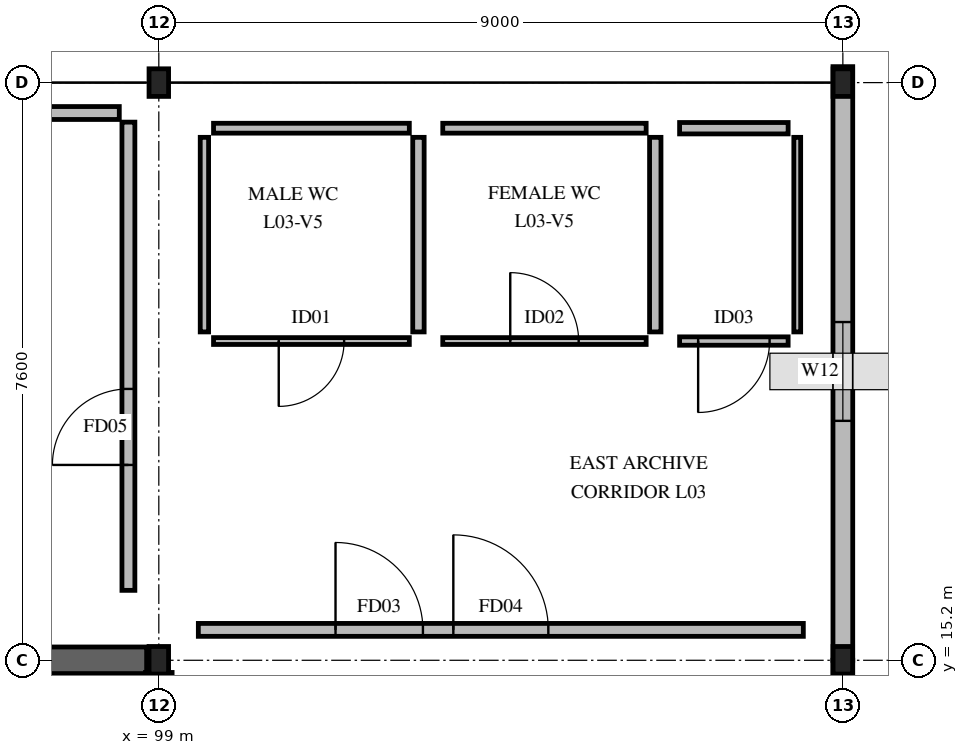
"""IFC4 building model, lengths in metres.
Left out: names, types, materials, properties, quantities, classifications, styles, units other than length and angle.
Written with IfcOpenShell. Run it as: python <this file> out.ifc"""

import sys

from ifc_helpers import new_model, si_unit, direction, frame, frame_2d, origin, origin_2d, place, context, subcontext, project, spatial, rectangle, i_section, extrude, element, fill, save


model = new_model("IFC4")
c1 = context("Model", 3, precision=1e-05, world=origin(), true_north=direction((0.0, 1.0)))
c2 = subcontext(c1, "Body", "Model", "MODEL_VIEW")
j1 = project(units=[si_unit("LENGTHUNIT", "METRE"), si_unit("PLANEANGLEUNIT", "RADIAN")], contexts=[c1])
p1 = place(None, origin())
s1 = spatial("IfcSite", under=j1, at=p1, CompositionType="ELEMENT")
p2 = place(p1, origin())
s2 = spatial("IfcBuilding", under=s1, at=p2, CompositionType="ELEMENT")
p3 = place(p2, frame((0.0, 0.0, 13.68)))
s3 = spatial("IfcBuildingStorey", under=s2, at=p3, CompositionType="ELEMENT", Elevation=13.68)
for number, where, z_axis, x_axis in (
    (1, (99.0, 15.2, 0.0), (0.0, 0.0, 1.0), (1.0, 0.0, 0.0)),
    (2, (99.0, 22.8, 0.0), (0.0, 0.0, 1.0), (1.0, 0.0, 0.0)),
    (3, (108.0, 15.2, 0.0), (0.0, 0.0, 1.0), (1.0, 0.0, 0.0)),
    (4, (108.0, 22.8, 0.0), (0.0, 0.0, 1.0), (1.0, 0.0, 0.0)),
):
    element("IfcColumn", number, at=place(p3, frame(where, z_axis=z_axis, x_axis=x_axis)), inside=s3, PredefinedType="COLUMN", context=c2, shape_type="SweptSolid", body=[
        extrude(i_section(OverallWidth=0.257, OverallDepth=0.363, WebThickness=0.013, FlangeThickness=0.022, FilletRadius=0.015, at=origin_2d()), origin(), (0.0, 0.0, 1.0), 4.32),
    ])
p4 = place(p3, frame((108.0, 7.6, 0.0), z_axis=(0.0, 0.0, 1.0), x_axis=(0.0, 1.0, 0.0)))
e5 = element("IfcWall", 5, at=p4, inside=s3, PredefinedType="STANDARD", context=c2, shape_type="SweptSolid", body=[
    extrude(rectangle(XDim=7.6, YDim=0.26, at=frame_2d((3.8, 0.0))), origin(), (0.0, 0.0, 1.0), 3.484),
])
p5 = place(p4, frame((3.325, 0.0, 0.85)))
e6 = element("IfcOpeningElement", 6, at=p5, cuts=e5, PredefinedType="OPENING", context=c2, shape_type="SweptSolid", body=[
    extrude(rectangle(XDim=0.95, YDim=1.35, at=frame_2d((0.475, 0.675))), frame((0.0, 0.14, 0.0), z_axis=(0.0, -1.0, 0.0), x_axis=(1.0, 0.0, 0.0)), (0.0, 0.0, 1.0), 0.28),
])
p6 = place(p3, frame((108.0, 15.2, 0.0), z_axis=(0.0, 0.0, 1.0), x_axis=(0.0, 1.0, 0.0)))
e7 = element("IfcWall", 7, at=p6, inside=s3, PredefinedType="STANDARD", context=c2, shape_type="SweptSolid", body=[
    extrude(rectangle(XDim=7.81, YDim=0.26, at=frame_2d((3.905, 0.0))), origin(), (0.0, 0.0, 1.0), 3.484),
])
p7 = place(p6, frame((3.15, 0.0, 0.85)))
e8 = element("IfcOpeningElement", 8, at=p7, cuts=e7, PredefinedType="OPENING", context=c2, shape_type="SweptSolid", body=[
    extrude(rectangle(XDim=1.3, YDim=1.35, at=frame_2d((0.65, 0.675))), frame((0.0, 0.14, 0.0), z_axis=(0.0, -1.0, 0.0), x_axis=(1.0, 0.0, 0.0)), (0.0, 0.0, 1.0), 0.28),
])
p8 = place(p3, frame((90.16, 15.2, 0.0), z_axis=(0.0, 0.0, 1.0), x_axis=(1.0, 0.0, 0.0)))
e9 = element("IfcWall", 9, at=p8, inside=s3, PredefinedType="SHEAR", context=c2, shape_type="SweptSolid", body=[
    extrude(rectangle(XDim=8.68, YDim=0.35, at=frame_2d((4.34, 0.0))), origin(), (0.0, 0.0, 1.0), 4.04),
])
p9 = place(p8, frame((1.85, 0.0, 0.0)))
e10 = element("IfcOpeningElement", 10, at=p9, cuts=e9, PredefinedType="OPENING", context=c2, shape_type="SweptSolid", body=[
    extrude(rectangle(XDim=1.0, YDim=2.15, at=frame_2d((0.5, 1.075))), frame((0.0, 0.185, 0.0), z_axis=(0.0, -1.0, 0.0), x_axis=(1.0, 0.0, 0.0)), (0.0, 0.0, 1.0), 0.37),
])
p10 = place(p8, frame((6.05, 0.0, 0.0)))
e11 = element("IfcOpeningElement", 11, at=p10, cuts=e9, PredefinedType="OPENING", context=c2, shape_type="SweptSolid", body=[
    extrude(rectangle(XDim=1.35, YDim=2.18, at=frame_2d((0.675, 1.09))), frame((0.0, 0.185, 0.0), z_axis=(0.0, -1.0, 0.0), x_axis=(1.0, 0.0, 0.0)), (0.0, 0.0, 1.0), 0.37),
])
p11 = place(p3, frame((99.0, 0.16, 0.0), z_axis=(0.0, 0.0, 1.0), x_axis=(0.0, 1.0, 0.0)))
e12 = element("IfcWall", 12, at=p11, inside=s3, PredefinedType="SHEAR", context=c2, shape_type="SweptSolid", body=[
    extrude(rectangle(XDim=14.88, YDim=0.35, at=frame_2d((7.44, 0.0))), origin(), (0.0, 0.0, 1.0), 4.04),
])
p12 = place(p3, frame((98.6, 16.12, 0.0), z_axis=(0.0, 0.0, 1.0), x_axis=(0.0, 1.0, 0.0)))
e13 = element("IfcWall", 13, at=p12, inside=s3, PredefinedType="PARTITIONING", context=c2, shape_type="SweptSolid", body=[
    extrude(rectangle(XDim=6.16, YDim=0.17, at=frame_2d((3.08, 0.0))), origin(), (0.0, 0.0, 1.0), 4.04),
])
p13 = place(p12, frame((1.65, 0.0, 0.0)))
e14 = element("IfcOpeningElement", 14, at=p13, cuts=e13, PredefinedType="OPENING", context=c2, shape_type="SweptSolid", body=[
    extrude(rectangle(XDim=1.0, YDim=2.15, at=frame_2d((0.5, 1.075))), frame((0.0, 0.095, 0.0), z_axis=(0.0, -1.0, 0.0), x_axis=(1.0, 0.0, 0.0)), (0.0, 0.0, 1.0), 0.19),
])
p14 = place(p3, frame((99.52, 15.6, 0.0), z_axis=(0.0, 0.0, 1.0), x_axis=(1.0, 0.0, 0.0)))
e15 = element("IfcWall", 15, at=p14, inside=s3, PredefinedType="PARTITIONING", context=c2, shape_type="SweptSolid", body=[
    extrude(rectangle(XDim=7.96, YDim=0.17, at=frame_2d((3.98, 0.0))), origin(), (0.0, 0.0, 1.0), 4.04),
])
p15 = place(p14, frame((3.355, 0.0, 0.0)))
e16 = element("IfcOpeningElement", 16, at=p15, cuts=e15, PredefinedType="OPENING", context=c2, shape_type="SweptSolid", body=[
    extrude(rectangle(XDim=1.25, YDim=2.18, at=frame_2d((0.625, 1.09))), frame((0.0, 0.095, 0.0), z_axis=(0.0, -1.0, 0.0), x_axis=(1.0, 0.0, 0.0)), (0.0, 0.0, 1.0), 0.19),
])
p16 = place(p14, frame((1.805, 0.0, 0.0)))
e17 = element("IfcOpeningElement", 17, at=p16, cuts=e15, PredefinedType="OPENING", context=c2, shape_type="SweptSolid", body=[
    extrude(rectangle(XDim=1.15, YDim=2.15, at=frame_2d((0.575, 1.075))), frame((0.0, 0.095, 0.0), z_axis=(0.0, -1.0, 0.0), x_axis=(1.0, 0.0, 0.0)), (0.0, 0.0, 1.0), 0.19),
])
p17 = place(p3, frame((99.72, 19.4, 0.0), z_axis=(0.0, 0.0, 1.0), x_axis=(1.0, 0.0, 0.0)))
e18 = element("IfcWall", 18, at=p17, inside=s3, PredefinedType="PARTITIONING", context=c2, shape_type="SweptSolid", body=[
    extrude(rectangle(XDim=2.576, YDim=0.09, at=frame_2d((1.288, 0.0))), origin(), (0.0, 0.0, 1.0), 4.04),
])
p18 = place(p17, frame((0.858, 0.0, 0.0)))
e19 = element("IfcOpeningElement", 19, at=p18, cuts=e18, PredefinedType="OPENING", context=c2, shape_type="SweptSolid", body=[
    extrude(rectangle(XDim=0.86, YDim=2.06, at=frame_2d((0.43, 1.03))), frame((0.0, 0.055, 0.0), z_axis=(0.0, -1.0, 0.0), x_axis=(1.0, 0.0, 0.0)), (0.0, 0.0, 1.0), 0.11),
])
p19 = place(p3, frame((102.416, 19.52, 0.0), z_axis=(0.0, 0.0, 1.0), x_axis=(0.0, 1.0, 0.0)))
e20 = element("IfcWall", 20, at=p19, inside=s3, PredefinedType="PARTITIONING", context=c2, shape_type="SweptSolid", body=[
    extrude(rectangle(XDim=2.56, YDim=0.15, at=frame_2d((1.28, 0.0))), origin(), (0.0, 0.0, 1.0), 4.04),
])
p20 = place(p3, frame((99.72, 22.2, 0.0), z_axis=(0.0, 0.0, 1.0), x_axis=(1.0, 0.0, 0.0)))
e21 = element("IfcWall", 21, at=p20, inside=s3, PredefinedType="PARTITIONING", context=c2, shape_type="SweptSolid", body=[
    extrude(rectangle(XDim=2.576, YDim=0.13, at=frame_2d((1.288, 0.0))), origin(), (0.0, 0.0, 1.0), 4.04),
])
p21 = place(p3, frame((99.6, 19.52, 0.0), z_axis=(0.0, 0.0, 1.0), x_axis=(0.0, 1.0, 0.0)))
e22 = element("IfcWall", 22, at=p21, inside=s3, PredefinedType="PARTITIONING", context=c2, shape_type="SweptSolid", body=[
    extrude(rectangle(XDim=2.56, YDim=0.11, at=frame_2d((1.28, 0.0))), origin(), (0.0, 0.0, 1.0), 4.04),
])
p22 = place(p3, frame((102.736, 19.4, 0.0), z_axis=(0.0, 0.0, 1.0), x_axis=(1.0, 0.0, 0.0)))
e23 = element("IfcWall", 23, at=p22, inside=s3, PredefinedType="PARTITIONING", context=c2, shape_type="SweptSolid", body=[
    extrude(rectangle(XDim=2.676, YDim=0.09, at=frame_2d((1.338, 0.0))), origin(), (0.0, 0.0, 1.0), 4.04),
])
p23 = place(p22, frame((0.888, 0.0, 0.0)))
e24 = element("IfcOpeningElement", 24, at=p23, cuts=e23, PredefinedType="OPENING", context=c2, shape_type="SweptSolid", body=[
    extrude(rectangle(XDim=0.9, YDim=2.06, at=frame_2d((0.45, 1.03))), frame((0.0, 0.055, 0.0), z_axis=(0.0, -1.0, 0.0), x_axis=(1.0, 0.0, 0.0)), (0.0, 0.0, 1.0), 0.11),
])
p24 = place(p3, frame((105.532, 19.52, 0.0), z_axis=(0.0, 0.0, 1.0), x_axis=(0.0, 1.0, 0.0)))
e25 = element("IfcWall", 25, at=p24, inside=s3, PredefinedType="PARTITIONING", context=c2, shape_type="SweptSolid", body=[
    extrude(rectangle(XDim=2.56, YDim=0.15, at=frame_2d((1.28, 0.0))), origin(), (0.0, 0.0, 1.0), 4.04),
])
p25 = place(p3, frame((102.736, 22.2, 0.0), z_axis=(0.0, 0.0, 1.0), x_axis=(1.0, 0.0, 0.0)))
e26 = element("IfcWall", 26, at=p25, inside=s3, PredefinedType="PARTITIONING", context=c2, shape_type="SweptSolid", body=[
    extrude(rectangle(XDim=2.676, YDim=0.13, at=frame_2d((1.338, 0.0))), origin(), (0.0, 0.0, 1.0), 4.04),
])
p26 = place(p3, frame((105.852, 19.4, 0.0), z_axis=(0.0, 0.0, 1.0), x_axis=(1.0, 0.0, 0.0)))
e27 = element("IfcWall", 27, at=p26, inside=s3, PredefinedType="PARTITIONING", context=c2, shape_type="SweptSolid", body=[
    extrude(rectangle(XDim=1.428, YDim=0.11, at=frame_2d((0.714, 0.0))), origin(), (0.0, 0.0, 1.0), 4.04),
])
p27 = place(p26, frame((0.244, 0.0, 0.0)))
e28 = element("IfcOpeningElement", 28, at=p27, cuts=e27, PredefinedType="OPENING", context=c2, shape_type="SweptSolid", body=[
    extrude(rectangle(XDim=0.94, YDim=2.06, at=frame_2d((0.47, 1.03))), frame((0.0, 0.065, 0.0), z_axis=(0.0, -1.0, 0.0), x_axis=(1.0, 0.0, 0.0)), (0.0, 0.0, 1.0), 0.13),
])
p28 = place(p3, frame((107.4, 19.52, 0.0), z_axis=(0.0, 0.0, 1.0), x_axis=(0.0, 1.0, 0.0)))
e29 = element("IfcWall", 29, at=p28, inside=s3, PredefinedType="PARTITIONING", context=c2, shape_type="SweptSolid", body=[
    extrude(rectangle(XDim=2.56, YDim=0.09, at=frame_2d((1.28, 0.0))), origin(), (0.0, 0.0, 1.0), 4.04),
])
p29 = place(p3, frame((105.852, 22.2, 0.0), z_axis=(0.0, 0.0, 1.0), x_axis=(1.0, 0.0, 0.0)))
e30 = element("IfcWall", 30, at=p29, inside=s3, PredefinedType="PARTITIONING", context=c2, shape_type="SweptSolid", body=[
    extrude(rectangle(XDim=1.428, YDim=0.15, at=frame_2d((0.714, 0.0))), origin(), (0.0, 0.0, 1.0), 4.04),
])
p30 = place(p3, frame((54.52, 22.4, 0.0), z_axis=(0.0, 0.0, 1.0), x_axis=(1.0, 0.0, 0.0)))
e31 = element("IfcWall", 31, at=p30, inside=s3, PredefinedType="PARTITIONING", context=c2, shape_type="SweptSolid", body=[
    extrude(rectangle(XDim=43.96, YDim=0.17, at=frame_2d((21.98, 0.0))), origin(), (0.0, 0.0, 1.0), 4.04),
])
p31 = place(p7, origin())
e32 = element("IfcWindow", 32, at=p31, inside=s3, PartitioningType="SINGLE_PANEL", PredefinedType="WINDOW", context=c2, shape_type="SweptSolid", body=[
    extrude(rectangle(XDim=1.3, YDim=1.35, at=frame_2d((0.65, 0.675))), frame((0.0, 0.03, 0.0), z_axis=(0.0, -1.0, 0.0), x_axis=(1.0, 0.0, 0.0)), (0.0, 0.0, 1.0), 0.06),
])
fill(e8, e32)
p32 = place(p13, origin())
e33 = element("IfcDoor", 33, at=p32, inside=s3, OperationType="SINGLE_SWING_LEFT", PredefinedType="DOOR", context=c2, shape_type="SweptSolid", body=[
    extrude(rectangle(XDim=1.0, YDim=2.15, at=frame_2d((0.5, 1.075))), frame((0.0, 0.025, 0.0), z_axis=(0.0, -1.0, 0.0), x_axis=(1.0, 0.0, 0.0)), (0.0, 0.0, 1.0), 0.05),
])
fill(e14, e33)
p33 = place(p15, origin())
e34 = element("IfcDoor", 34, at=p33, inside=s3, OperationType="SINGLE_SWING_LEFT", PredefinedType="DOOR", context=c2, shape_type="SweptSolid", body=[
    extrude(rectangle(XDim=1.25, YDim=2.18, at=frame_2d((0.625, 1.09))), frame((0.0, 0.025, 0.0), z_axis=(0.0, -1.0, 0.0), x_axis=(1.0, 0.0, 0.0)), (0.0, 0.0, 1.0), 0.05),
])
fill(e16, e34)
p34 = place(p18, origin())
e35 = element("IfcDoor", 35, at=p34, inside=s3, OperationType="SINGLE_SWING_RIGHT", PredefinedType="DOOR", context=c2, shape_type="SweptSolid", body=[
    extrude(rectangle(XDim=0.86, YDim=2.06, at=frame_2d((0.43, 1.03))), frame((0.0, 0.025, 0.0), z_axis=(0.0, -1.0, 0.0), x_axis=(1.0, 0.0, 0.0)), (0.0, 0.0, 1.0), 0.05),
])
fill(e19, e35)
p35 = place(p23, origin())
e36 = element("IfcDoor", 36, at=p35, inside=s3, OperationType="SINGLE_SWING_LEFT", PredefinedType="DOOR", context=c2, shape_type="SweptSolid", body=[
    extrude(rectangle(XDim=0.9, YDim=2.06, at=frame_2d((0.45, 1.03))), frame((0.0, 0.025, 0.0), z_axis=(0.0, -1.0, 0.0), x_axis=(1.0, 0.0, 0.0)), (0.0, 0.0, 1.0), 0.05),
])
fill(e24, e36)
p36 = place(p27, origin())
e37 = element("IfcDoor", 37, at=p36, inside=s3, OperationType="SINGLE_SWING_RIGHT", PredefinedType="DOOR", context=c2, shape_type="SweptSolid", body=[
    extrude(rectangle(XDim=0.94, YDim=2.06, at=frame_2d((0.47, 1.03))), frame((0.0, 0.025, 0.0), z_axis=(0.0, -1.0, 0.0), x_axis=(1.0, 0.0, 0.0)), (0.0, 0.0, 1.0), 0.05),
])
fill(e28, e37)
p37 = place(p16, origin())
e38 = element("IfcDoor", 38, at=p37, inside=s3, OperationType="SINGLE_SWING_LEFT", PredefinedType="DOOR", context=c2, shape_type="SweptSolid", body=[
    extrude(rectangle(XDim=1.15, YDim=2.15, at=frame_2d((0.575, 1.075))), frame((0.0, 0.025, 0.0), z_axis=(0.0, -1.0, 0.0), x_axis=(1.0, 0.0, 0.0)), (0.0, 0.0, 1.0), 0.05),
])
fill(e17, e38)
save(model, sys.argv[1])
